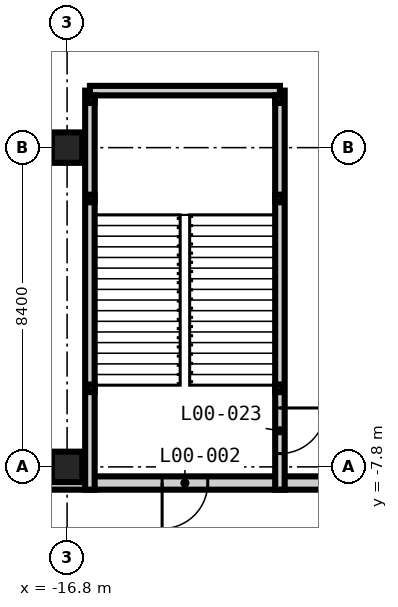
"""IFC4 building model, lengths in metres.
Left out: names, types, materials, properties, quantities, classifications, styles, units other than length and angle.
Written with IfcOpenShell. Run it as: python <this file> out.ifc"""

import sys

from ifc_helpers import new_model, si_unit, direction, frame, frame_2d, origin, origin_2d, place, context, subcontext, project, spatial, rectangle, hollow_rectangle, extrude, element, fill, save


model = new_model("IFC4")
c1 = context("Model", 3, precision=1e-05, world=origin(), true_north=direction((0.0, 1.0)))
c2 = subcontext(c1, "Body", "Model", "MODEL_VIEW")
j1 = project(units=[si_unit("LENGTHUNIT", "METRE"), si_unit("PLANEANGLEUNIT", "RADIAN")], contexts=[c1])
p1 = place(None, origin())
s1 = spatial("IfcSite", under=j1, at=p1, CompositionType="ELEMENT")
p2 = place(p1, origin())
s2 = spatial("IfcBuilding", under=s1, at=p2, CompositionType="ELEMENT")
p3 = place(p2, origin())
s3 = spatial("IfcBuildingStorey", under=s2, at=p3, CompositionType="ELEMENT", Elevation=0.0)
for number, where, z_axis, x_axis in (
    (1, (-16.8, -7.8, -0.5), (0.0, 0.0, 1.0), (1.0, 0.0, 0.0)),
    (2, (-16.8, 0.6, -0.5), (0.0, 0.0, 1.0), (1.0, 0.0, 0.0)),
):
    element("IfcColumn", number, at=place(p3, frame(where, z_axis=z_axis, x_axis=x_axis)), inside=s3, PredefinedType="COLUMN", context=c2, shape_type="SweptSolid", body=[
        extrude(rectangle(XDim=0.8, YDim=0.8, at=origin_2d()), origin(), (0.0, 0.0, 1.0), 6.2),
    ])
p4 = place(p3, frame((-33.6, -8.225, 0.0), z_axis=(0.0, 0.0, 1.0), x_axis=(1.0, 0.0, 0.0)))
e3 = element("IfcWall", 3, at=p4, inside=s3, PredefinedType="SOLIDWALL", context=c2, shape_type="SweptSolid", body=[
    extrude(rectangle(XDim=92.4, YDim=0.35, at=frame_2d((46.2, 0.0))), origin(), (0.0, 0.0, 1.0), 5.7),
])
p5 = place(p4, frame((5.4, 0.0, 0.0)))
e4 = element("IfcOpeningElement", 4, at=p5, cuts=e3, PredefinedType="OPENING", context=c2, shape_type="SweptSolid", body=[
    extrude(rectangle(XDim=1.8, YDim=2.7, at=frame_2d((0.9, 1.35))), frame((0.0, 0.185, 0.0), z_axis=(0.0, -1.0, 0.0), x_axis=(1.0, 0.0, 0.0)), (0.0, 0.0, 1.0), 0.37),
])
p6 = place(p4, frame((2.8, 0.0, 0.9)))
e5 = element("IfcOpeningElement", 5, at=p6, cuts=e3, PredefinedType="OPENING", context=c2, shape_type="SweptSolid", body=[
    extrude(rectangle(XDim=2.4, YDim=2.4, at=frame_2d((1.2, 1.2))), frame((0.0, 0.185, 0.0), z_axis=(0.0, -1.0, 0.0), x_axis=(1.0, 0.0, 0.0)), (0.0, 0.0, 1.0), 0.37),
])
p7 = place(p4, frame((9.3, 0.0, 0.9)))
e6 = element("IfcOpeningElement", 6, at=p7, cuts=e3, PredefinedType="OPENING", context=c2, shape_type="SweptSolid", body=[
    extrude(rectangle(XDim=2.4, YDim=2.4, at=frame_2d((1.2, 1.2))), frame((0.0, 0.185, 0.0), z_axis=(0.0, -1.0, 0.0), x_axis=(1.0, 0.0, 0.0)), (0.0, 0.0, 1.0), 0.37),
])
p8 = place(p4, frame((13.8, 0.0, 0.9)))
e7 = element("IfcOpeningElement", 7, at=p8, cuts=e3, PredefinedType="OPENING", context=c2, shape_type="SweptSolid", body=[
    extrude(rectangle(XDim=2.4, YDim=2.4, at=frame_2d((1.2, 1.2))), frame((0.0, 0.185, 0.0), z_axis=(0.0, -1.0, 0.0), x_axis=(1.0, 0.0, 0.0)), (0.0, 0.0, 1.0), 0.37),
])
p9 = place(p4, frame((19.3, 0.0, 0.0)))
e8 = element("IfcOpeningElement", 8, at=p9, cuts=e3, PredefinedType="OPENING", context=c2, shape_type="SweptSolid", body=[
    extrude(rectangle(XDim=1.2, YDim=2.4, at=frame_2d((0.6, 1.2))), frame((0.0, 0.185, 0.0), z_axis=(0.0, -1.0, 0.0), x_axis=(1.0, 0.0, 0.0)), (0.0, 0.0, 1.0), 0.37),
])
p10 = place(p4, frame((26.8, 0.0, 0.0)))
e9 = element("IfcOpeningElement", 9, at=p10, cuts=e3, PredefinedType="OPENING", context=c2, shape_type="SweptSolid", body=[
    extrude(rectangle(XDim=2.4, YDim=3.0, at=frame_2d((1.2, 1.5))), frame((0.0, 0.185, 0.0), z_axis=(0.0, -1.0, 0.0), x_axis=(1.0, 0.0, 0.0)), (0.0, 0.0, 1.0), 0.37),
])
p11 = place(p4, frame((36.9, 0.0, 0.0)))
e10 = element("IfcOpeningElement", 10, at=p11, cuts=e3, PredefinedType="OPENING", context=c2, shape_type="SweptSolid", body=[
    extrude(rectangle(XDim=1.8, YDim=2.4, at=frame_2d((0.9, 1.2))), frame((0.0, 0.185, 0.0), z_axis=(0.0, -1.0, 0.0), x_axis=(1.0, 0.0, 0.0)), (0.0, 0.0, 1.0), 0.37),
])
p12 = place(p4, frame((38.9, 0.0, 0.9)))
e11 = element("IfcOpeningElement", 11, at=p12, cuts=e3, PredefinedType="OPENING", context=c2, shape_type="SweptSolid", body=[
    extrude(rectangle(XDim=2.4, YDim=2.4, at=frame_2d((1.2, 1.2))), frame((0.0, 0.185, 0.0), z_axis=(0.0, -1.0, 0.0), x_axis=(1.0, 0.0, 0.0)), (0.0, 0.0, 1.0), 0.37),
])
p13 = place(p4, frame((53.7, 0.0, 0.0)))
e12 = element("IfcOpeningElement", 12, at=p13, cuts=e3, PredefinedType="OPENING", context=c2, shape_type="SweptSolid", body=[
    extrude(rectangle(XDim=1.8, YDim=2.4, at=frame_2d((0.9, 1.2))), frame((0.0, 0.185, 0.0), z_axis=(0.0, -1.0, 0.0), x_axis=(1.0, 0.0, 0.0)), (0.0, 0.0, 1.0), 0.37),
])
p14 = place(p4, frame((51.1, 0.0, 0.9)))
e13 = element("IfcOpeningElement", 13, at=p14, cuts=e3, PredefinedType="OPENING", context=c2, shape_type="SweptSolid", body=[
    extrude(rectangle(XDim=2.4, YDim=2.4, at=frame_2d((1.2, 1.2))), frame((0.0, 0.185, 0.0), z_axis=(0.0, -1.0, 0.0), x_axis=(1.0, 0.0, 0.0)), (0.0, 0.0, 1.0), 0.37),
])
p15 = place(p4, frame((61.8, 0.0, 0.0)))
e14 = element("IfcOpeningElement", 14, at=p15, cuts=e3, PredefinedType="OPENING", context=c2, shape_type="SweptSolid", body=[
    extrude(rectangle(XDim=2.4, YDim=3.0, at=frame_2d((1.2, 1.5))), frame((0.0, 0.185, 0.0), z_axis=(0.0, -1.0, 0.0), x_axis=(1.0, 0.0, 0.0)), (0.0, 0.0, 1.0), 0.37),
])
p16 = place(p4, frame((72.7, 0.0, 0.9)))
e15 = element("IfcOpeningElement", 15, at=p16, cuts=e3, PredefinedType="OPENING", context=c2, shape_type="SweptSolid", body=[
    extrude(rectangle(XDim=2.4, YDim=2.4, at=frame_2d((1.2, 1.2))), frame((0.0, 0.185, 0.0), z_axis=(0.0, -1.0, 0.0), x_axis=(1.0, 0.0, 0.0)), (0.0, 0.0, 1.0), 0.37),
])
p17 = place(p4, frame((81.1, 0.0, 0.9)))
e16 = element("IfcOpeningElement", 16, at=p17, cuts=e3, PredefinedType="OPENING", context=c2, shape_type="SweptSolid", body=[
    extrude(rectangle(XDim=2.4, YDim=2.4, at=frame_2d((1.2, 1.2))), frame((0.0, 0.185, 0.0), z_axis=(0.0, -1.0, 0.0), x_axis=(1.0, 0.0, 0.0)), (0.0, 0.0, 1.0), 0.37),
])
p18 = place(p4, frame((88.9, 0.0, 0.9)))
e17 = element("IfcOpeningElement", 17, at=p18, cuts=e3, PredefinedType="OPENING", context=c2, shape_type="SweptSolid", body=[
    extrude(rectangle(XDim=2.4, YDim=2.4, at=frame_2d((1.2, 1.2))), frame((0.0, 0.185, 0.0), z_axis=(0.0, -1.0, 0.0), x_axis=(1.0, 0.0, 0.0)), (0.0, 0.0, 1.0), 0.37),
])
p19 = place(p3, frame((-16.2, -8.4, 0.0), z_axis=(0.0, 0.0, 1.0), x_axis=(0.0, 1.0, 0.0)))
e18 = element("IfcWall", 18, at=p19, inside=s3, PredefinedType="PARTITIONING", context=c2, shape_type="SweptSolid", body=[
    extrude(rectangle(XDim=10.5, YDim=0.25, at=frame_2d((5.25, 0.0))), origin(), (0.0, 0.0, 1.0), 5.7),
])
p20 = place(p3, frame((-11.2, -8.4, 0.0), z_axis=(0.0, 0.0, 1.0), x_axis=(0.0, 1.0, 0.0)))
e19 = element("IfcWall", 19, at=p20, inside=s3, PredefinedType="PARTITIONING", context=c2, shape_type="SweptSolid", body=[
    extrude(rectangle(XDim=10.5, YDim=0.25, at=frame_2d((5.25, 0.0))), origin(), (0.0, 0.0, 1.0), 5.7),
])
p21 = place(p20, frame((0.95, 0.0, 0.0)))
e20 = element("IfcOpeningElement", 20, at=p21, cuts=e19, PredefinedType="OPENING", context=c2, shape_type="SweptSolid", body=[
    extrude(rectangle(XDim=1.2, YDim=2.2, at=frame_2d((0.6, 1.1))), frame((0.0, 0.135, 0.0), z_axis=(0.0, -1.0, 0.0), x_axis=(1.0, 0.0, 0.0)), (0.0, 0.0, 1.0), 0.27),
])
p22 = place(p3, frame((-16.2, 2.1, 0.0), z_axis=(0.0, 0.0, 1.0), x_axis=(1.0, 0.0, 0.0)))
e21 = element("IfcWall", 21, at=p22, inside=s3, PredefinedType="PARTITIONING", context=c2, shape_type="SweptSolid", body=[
    extrude(rectangle(XDim=5.0, YDim=0.25, at=frame_2d((2.5, 0.0))), origin(), (0.0, 0.0, 1.0), 5.7),
])
for number, where, z_axis, x_axis in (
    (22, (-16.175, -5.732, -0.5), (0.0, 0.0, 1.0), (1.0, 0.0, 0.0)),
    (23, (-11.225, -5.732, -0.5), (0.0, 0.0, 1.0), (1.0, 0.0, 0.0)),
    (24, (-16.175, -0.738, -0.5), (0.0, 0.0, 1.0), (1.0, 0.0, 0.0)),
    (25, (-11.225, -0.738, -0.5), (0.0, 0.0, 1.0), (1.0, 0.0, 0.0)),
    (26, (-16.175, 1.875, -0.5), (0.0, 0.0, 1.0), (1.0, 0.0, 0.0)),
    (27, (-11.225, 1.875, -0.5), (0.0, 0.0, 1.0), (1.0, 0.0, 0.0)),
):
    element("IfcColumn", number, at=place(p3, frame(where, z_axis=z_axis, x_axis=x_axis)), inside=s3, PredefinedType="COLUMN", context=c2, shape_type="SweptSolid", body=[
        extrude(hollow_rectangle(XDim=0.2, YDim=0.2, WallThickness=0.01, at=origin_2d()), origin(), (0.0, 0.0, 1.0), 6.2),
    ])
p23 = place(p9, frame((1.2, 0.0, 0.0), z_axis=(0.0, 0.0, 1.0), x_axis=(-1.0, 0.0, 0.0)))
e28 = element("IfcDoor", 28, at=p23, inside=s3, OperationType="SINGLE_SWING_RIGHT", PredefinedType="DOOR", context=c2, shape_type="SweptSolid", body=[
    extrude(rectangle(XDim=1.2, YDim=2.4, at=frame_2d((0.6, 1.2))), frame((0.0, 0.025, 0.0), z_axis=(0.0, -1.0, 0.0), x_axis=(1.0, 0.0, 0.0)), (0.0, 0.0, 1.0), 0.05),
])
fill(e8, e28)
p24 = place(p21, frame((1.2, 0.0, 0.0), z_axis=(0.0, 0.0, 1.0), x_axis=(-1.0, 0.0, 0.0)))
e29 = element("IfcDoor", 29, at=p24, inside=s3, OperationType="SINGLE_SWING_LEFT", PredefinedType="DOOR", context=c2, shape_type="SweptSolid", body=[
    extrude(rectangle(XDim=1.2, YDim=2.2, at=frame_2d((0.6, 1.1))), frame((0.0, 0.025, 0.0), z_axis=(0.0, -1.0, 0.0), x_axis=(1.0, 0.0, 0.0)), (0.0, 0.0, 1.0), 0.05),
])
fill(e20, e29)
save(model, sys.argv[1])
